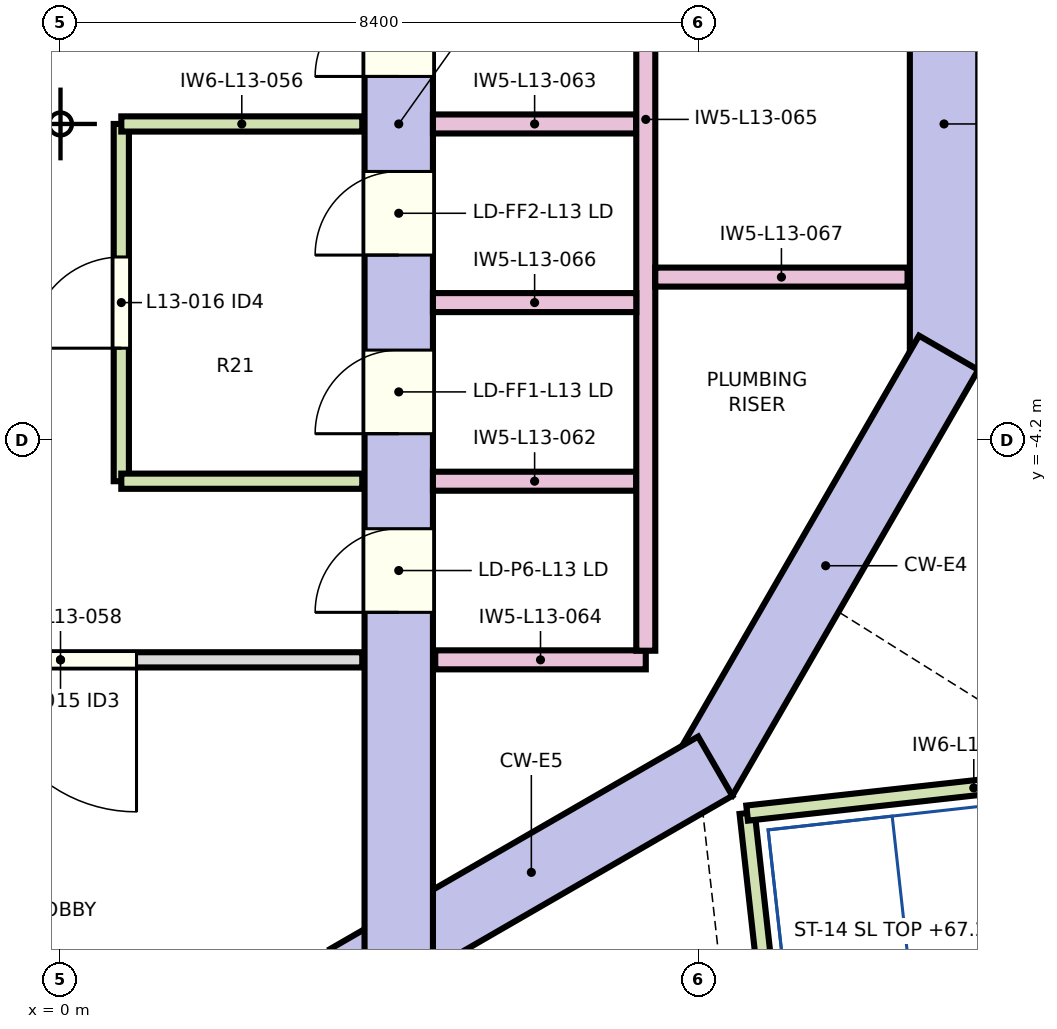
"""IFC4 building model, lengths in metres.
Left out: names, types, materials, properties, quantities, classifications, styles, units other than length and angle.
Written with IfcOpenShell. Run it as: python <this file> out.ifc"""

import sys

from ifc_helpers import new_model, si_unit, direction, frame, frame_2d, origin, place, context, subcontext, project, spatial, rectangle, extrude, element, fill, save


model = new_model("IFC4")
c1 = context("Model", 3, precision=1e-05, world=origin(), true_north=direction((0.0, 1.0)))
c2 = subcontext(c1, "Body", "Model", "MODEL_VIEW")
j1 = project(units=[si_unit("LENGTHUNIT", "METRE"), si_unit("PLANEANGLEUNIT", "RADIAN")], contexts=[c1])
p1 = place(None, origin())
s1 = spatial("IfcSite", under=j1, at=p1, CompositionType="ELEMENT")
p2 = place(p1, origin())
s2 = spatial("IfcBuilding", under=s1, at=p2, CompositionType="ELEMENT")
p3 = place(p2, frame((0.0, 0.0, 65.3)))
s3 = spatial("IfcBuildingStorey", under=s2, at=p3, CompositionType="ELEMENT", Elevation=65.3)
p4 = place(p3, frame((11.624, 3.235, 0.0), z_axis=(0.0, 0.0, 1.0), x_axis=(0.0, -1.0, 0.0)))
e1 = element("IfcWall", 1, at=p4, inside=s3, PredefinedType="SHEAR", context=c2, shape_type="SweptSolid", body=[
    extrude(rectangle(XDim=6.471, YDim=0.9, at=frame_2d((3.235, 0.0))), origin(), (0.0, 0.0, 1.0), 3.8),
])
p5 = place(p3, frame((11.684, -3.01, 0.0), z_axis=(0.0, 0.0, 1.0), x_axis=(-0.499990282633, -0.866031014036, 0.0)))
e2 = element("IfcWall", 2, at=p5, inside=s3, PredefinedType="SHEAR", context=c2, shape_type="SweptSolid", body=[
    extrude(rectangle(XDim=6.47, YDim=0.9, at=frame_2d((3.235, 0.0))), origin(), (0.0, 0.0, 1.0), 3.8),
])
p6 = place(p3, frame((8.614, -8.449, 0.0), z_axis=(0.0, 0.0, 1.0), x_axis=(-0.866026961591, -0.49999730179, 0.0)))
e3 = element("IfcWall", 3, at=p6, inside=s3, PredefinedType="SHEAR", context=c2, shape_type="SweptSolid", body=[
    extrude(rectangle(XDim=5.587, YDim=0.9, at=frame_2d((2.794, 0.0))), origin(), (0.0, 0.0, 1.0), 3.8),
])
p7 = place(p3, frame((4.45, -11.633, 0.0), z_axis=(0.0, 0.0, 1.0), x_axis=(0.0, 1.0, 0.0)))
e4 = element("IfcWall", 4, at=p7, inside=s3, PredefinedType="SHEAR", context=c2, shape_type="SweptSolid", body=[
    extrude(rectangle(XDim=23.265, YDim=0.9, at=frame_2d((11.633, 0.0))), origin(), (0.0, 0.0, 1.0), 3.8),
])
p8 = place(p7, frame((7.558, 0.0, 0.0)))
e5 = element("IfcOpeningElement", 5, at=p8, cuts=e4, PredefinedType="OPENING", context=c2, shape_type="SweptSolid", body=[
    extrude(rectangle(XDim=1.1, YDim=2.1, at=frame_2d((0.55, 1.05))), frame((0.0, 0.46, 0.0), z_axis=(0.0, -1.0, 0.0), x_axis=(1.0, 0.0, 0.0)), (0.0, 0.0, 1.0), 0.92),
])
p9 = place(p7, frame((9.907, 0.0, 0.0)))
e6 = element("IfcOpeningElement", 6, at=p9, cuts=e4, PredefinedType="OPENING", context=c2, shape_type="SweptSolid", body=[
    extrude(rectangle(XDim=1.1, YDim=2.1, at=frame_2d((0.55, 1.05))), frame((0.0, 0.46, 0.0), z_axis=(0.0, -1.0, 0.0), x_axis=(1.0, 0.0, 0.0)), (0.0, 0.0, 1.0), 0.92),
])
p10 = place(p7, frame((12.258, 0.0, 0.0)))
e7 = element("IfcOpeningElement", 7, at=p10, cuts=e4, PredefinedType="OPENING", context=c2, shape_type="SweptSolid", body=[
    extrude(rectangle(XDim=1.1, YDim=2.1, at=frame_2d((0.55, 1.05))), frame((0.0, 0.46, 0.0), z_axis=(0.0, -1.0, 0.0), x_axis=(1.0, 0.0, 0.0)), (0.0, 0.0, 1.0), 0.92),
])
p11 = place(p7, frame((14.607, 0.0, 0.0)))
e8 = element("IfcOpeningElement", 8, at=p11, cuts=e4, PredefinedType="OPENING", context=c2, shape_type="SweptSolid", body=[
    extrude(rectangle(XDim=1.1, YDim=2.1, at=frame_2d((0.55, 1.05))), frame((0.0, 0.46, 0.0), z_axis=(0.0, -1.0, 0.0), x_axis=(1.0, 0.0, 0.0)), (0.0, 0.0, 1.0), 0.92),
])
p12 = place(p7, frame((5.208, 0.0, 0.0)))
e9 = element("IfcOpeningElement", 9, at=p12, cuts=e4, PredefinedType="OPENING", context=c2, shape_type="SweptSolid", body=[
    extrude(rectangle(XDim=1.1, YDim=2.1, at=frame_2d((0.55, 1.05))), frame((0.0, 0.46, 0.0), z_axis=(0.0, -1.0, 0.0), x_axis=(1.0, 0.0, 0.0)), (0.0, 0.0, 1.0), 0.92),
])
p13 = place(p7, frame((17.008, 0.0, 0.0)))
e10 = element("IfcOpeningElement", 10, at=p13, cuts=e4, PredefinedType="OPENING", context=c2, shape_type="SweptSolid", body=[
    extrude(rectangle(XDim=1.0, YDim=2.1, at=frame_2d((0.5, 1.05))), frame((0.0, 0.46, 0.0), z_axis=(0.0, -1.0, 0.0), x_axis=(1.0, 0.0, 0.0)), (0.0, 0.0, 1.0), 0.92),
])
p14 = place(p3, frame((0.8, -4.7, 0.0), z_axis=(0.0, 0.0, 1.0), x_axis=(0.0, 1.0, 0.0)))
e11 = element("IfcWall", 11, at=p14, inside=s3, PredefinedType="SOLIDWALL", context=c2, shape_type="SweptSolid", body=[
    extrude(rectangle(XDim=4.7, YDim=0.2, at=frame_2d((2.35, 0.0))), origin(), (0.0, 0.0, 1.0), 3.55),
])
p15 = place(p14, frame((1.75, 0.0, 0.0)))
e12 = element("IfcOpeningElement", 12, at=p15, cuts=e11, PredefinedType="OPENING", context=c2, shape_type="SweptSolid", body=[
    extrude(rectangle(XDim=1.2, YDim=2.1, at=frame_2d((0.6, 1.05))), frame((0.0, 0.11, 0.0), z_axis=(0.0, -1.0, 0.0), x_axis=(1.0, 0.0, 0.0)), (0.0, 0.0, 1.0), 0.22),
])
p16 = place(p3, frame((0.8, 0.0, 0.0), z_axis=(0.0, 0.0, 1.0), x_axis=(1.0, 0.0, 0.0)))
e13 = element("IfcWall", 13, at=p16, inside=s3, PredefinedType="SOLIDWALL", context=c2, shape_type="SweptSolid", body=[
    extrude(rectangle(XDim=3.17, YDim=0.2, at=frame_2d((1.585, 0.0))), origin(), (0.0, 0.0, 1.0), 3.55),
])
p17 = place(p3, frame((3.97, -7.05, 0.0), z_axis=(0.0, 0.0, 1.0), x_axis=(-1.0, 0.0, 0.0)))
e14 = element("IfcWall", 14, at=p17, inside=s3, PredefinedType="PARTITIONING", context=c2, shape_type="SweptSolid", body=[
    extrude(rectangle(XDim=7.94, YDim=0.2, at=frame_2d((3.97, 0.0))), origin(), (0.0, 0.0, 1.0), 3.55),
])
p18 = place(p17, frame((2.97, 0.0, 0.0)))
e15 = element("IfcOpeningElement", 15, at=p18, cuts=e14, PredefinedType="OPENING", context=c2, shape_type="SweptSolid", body=[
    extrude(rectangle(XDim=2.0, YDim=2.1, at=frame_2d((1.0, 1.05))), frame((0.0, 0.11, 0.0), z_axis=(0.0, -1.0, 0.0), x_axis=(1.0, 0.0, 0.0)), (0.0, 0.0, 1.0), 0.22),
])
p19 = place(p3, frame((3.97, -4.7, 0.0), z_axis=(0.0, 0.0, 1.0), x_axis=(-1.0, 0.0, 0.0)))
e16 = element("IfcWall", 16, at=p19, inside=s3, PredefinedType="SOLIDWALL", context=c2, shape_type="SweptSolid", body=[
    extrude(rectangle(XDim=3.17, YDim=0.2, at=frame_2d((1.585, 0.0))), origin(), (0.0, 0.0, 1.0), 3.55),
])
for number, where, z_axis, x_axis in (
    (17, (4.9, -4.7, 0.0), (0.0, 0.0, 1.0), (1.0, 0.0, 0.0)),
    (18, (4.9, 0.0, 0.0), (0.0, 0.0, 1.0), (1.0, 0.0, 0.0)),
):
    element("IfcWall", number, at=place(p3, frame(where, z_axis=z_axis, x_axis=x_axis)), inside=s3, PredefinedType="SOLIDWALL", context=c2, shape_type="SweptSolid", body=[
        extrude(rectangle(XDim=2.675, YDim=0.25, at=frame_2d((1.337, 0.0))), origin(), (0.0, 0.0, 1.0), 3.55),
    ])
p20 = place(p3, frame((4.93, -7.05, 0.0), z_axis=(0.0, 0.0, 1.0), x_axis=(1.0, 0.0, 0.0)))
e19 = element("IfcWall", 19, at=p20, inside=s3, PredefinedType="SOLIDWALL", context=c2, shape_type="SweptSolid", body=[
    extrude(rectangle(XDim=2.77, YDim=0.25, at=frame_2d((1.385, 0.0))), origin(), (0.0, 0.0, 1.0), 3.55),
])
p21 = place(p3, frame((7.7, -6.93, 0.0), z_axis=(0.0, 0.0, 1.0), x_axis=(0.0, 1.0, 0.0)))
e20 = element("IfcWall", 20, at=p21, inside=s3, PredefinedType="SOLIDWALL", context=c2, shape_type="SweptSolid", body=[
    extrude(rectangle(XDim=13.98, YDim=0.25, at=frame_2d((6.99, 0.0))), origin(), (0.0, 0.0, 1.0), 3.55),
])
p22 = place(p3, frame((7.575, -2.35, 0.0), z_axis=(0.0, 0.0, 1.0), x_axis=(-1.0, 0.0, 0.0)))
e21 = element("IfcWall", 21, at=p22, inside=s3, PredefinedType="SOLIDWALL", context=c2, shape_type="SweptSolid", body=[
    extrude(rectangle(XDim=2.675, YDim=0.25, at=frame_2d((1.337, 0.0))), origin(), (0.0, 0.0, 1.0), 3.55),
])
p23 = place(p3, frame((7.825, -2.015, 0.0), z_axis=(0.0, 0.0, 1.0), x_axis=(1.0, 0.0, 0.0)))
e22 = element("IfcWall", 22, at=p23, inside=s3, PredefinedType="SOLIDWALL", context=c2, shape_type="SweptSolid", body=[
    extrude(rectangle(XDim=3.319, YDim=0.25, at=frame_2d((1.66, 0.0))), origin(), (0.0, 0.0, 1.0), 3.55),
])
p24 = place(p3, frame((9.033, -9.066, 0.0), z_axis=(0.0, 0.0, 1.0), x_axis=(0.11030110325, -0.993898217436, 0.0)))
e23 = element("IfcWall", 23, at=p24, inside=s3, PredefinedType="SOLIDWALL", context=c2, shape_type="SweptSolid", body=[
    extrude(rectangle(XDim=3.493, YDim=0.2, at=frame_2d((1.746, 0.0))), origin(), (0.0, 0.0, 1.0), 3.55),
])
p25 = place(p3, frame((14.997, -8.404, 0.0), z_axis=(0.0, 0.0, 1.0), x_axis=(-0.993897125329, -0.110310943534, 0.0)))
e24 = element("IfcWall", 24, at=p25, inside=s3, PredefinedType="SOLIDWALL", context=c2, shape_type="SweptSolid", body=[
    extrude(rectangle(XDim=6.0, YDim=0.2, at=frame_2d((3.0, 0.0))), origin(), (0.0, 0.0, 1.0), 3.55),
])
p26 = place(p18, origin())
e25 = element("IfcDoor", 25, at=p26, inside=s3, OperationType="NOTDEFINED", PredefinedType="DOOR", context=c2, shape_type="SweptSolid", body=[
    extrude(rectangle(XDim=2.0, YDim=2.1, at=frame_2d((1.0, 1.05))), frame((0.0, 0.025, 0.0), z_axis=(0.0, -1.0, 0.0), x_axis=(1.0, 0.0, 0.0)), (0.0, 0.0, 1.0), 0.05),
])
fill(e15, e25)
p27 = place(p15, origin())
e26 = element("IfcDoor", 26, at=p27, inside=s3, OperationType="NOTDEFINED", PredefinedType="DOOR", context=c2, shape_type="SweptSolid", body=[
    extrude(rectangle(XDim=1.2, YDim=2.1, at=frame_2d((0.6, 1.05))), frame((0.0, 0.025, 0.0), z_axis=(0.0, -1.0, 0.0), x_axis=(1.0, 0.0, 0.0)), (0.0, 0.0, 1.0), 0.05),
])
fill(e12, e26)
p28 = place(p8, origin())
e27 = element("IfcDoor", 27, at=p28, inside=s3, OperationType="SLIDING_TO_LEFT", PredefinedType="DOOR", context=c2, shape_type="SweptSolid", body=[
    extrude(rectangle(XDim=1.1, YDim=2.1, at=frame_2d((0.55, 1.05))), frame((0.0, 0.025, 0.0), z_axis=(0.0, -1.0, 0.0), x_axis=(1.0, 0.0, 0.0)), (0.0, 0.0, 1.0), 0.05),
])
fill(e5, e27)
p29 = place(p9, origin())
e28 = element("IfcDoor", 28, at=p29, inside=s3, OperationType="SLIDING_TO_LEFT", PredefinedType="DOOR", context=c2, shape_type="SweptSolid", body=[
    extrude(rectangle(XDim=1.1, YDim=2.1, at=frame_2d((0.55, 1.05))), frame((0.0, 0.025, 0.0), z_axis=(0.0, -1.0, 0.0), x_axis=(1.0, 0.0, 0.0)), (0.0, 0.0, 1.0), 0.05),
])
fill(e6, e28)
p30 = place(p10, origin())
e29 = element("IfcDoor", 29, at=p30, inside=s3, OperationType="SLIDING_TO_LEFT", PredefinedType="DOOR", context=c2, shape_type="SweptSolid", body=[
    extrude(rectangle(XDim=1.1, YDim=2.1, at=frame_2d((0.55, 1.05))), frame((0.0, 0.025, 0.0), z_axis=(0.0, -1.0, 0.0), x_axis=(1.0, 0.0, 0.0)), (0.0, 0.0, 1.0), 0.05),
])
fill(e7, e29)
p31 = place(p12, origin())
e30 = element("IfcDoor", 30, at=p31, inside=s3, OperationType="SLIDING_TO_LEFT", PredefinedType="DOOR", context=c2, shape_type="SweptSolid", body=[
    extrude(rectangle(XDim=1.1, YDim=2.1, at=frame_2d((0.55, 1.05))), frame((0.0, 0.025, 0.0), z_axis=(0.0, -1.0, 0.0), x_axis=(1.0, 0.0, 0.0)), (0.0, 0.0, 1.0), 0.05),
])
fill(e9, e30)
save(model, sys.argv[1])
